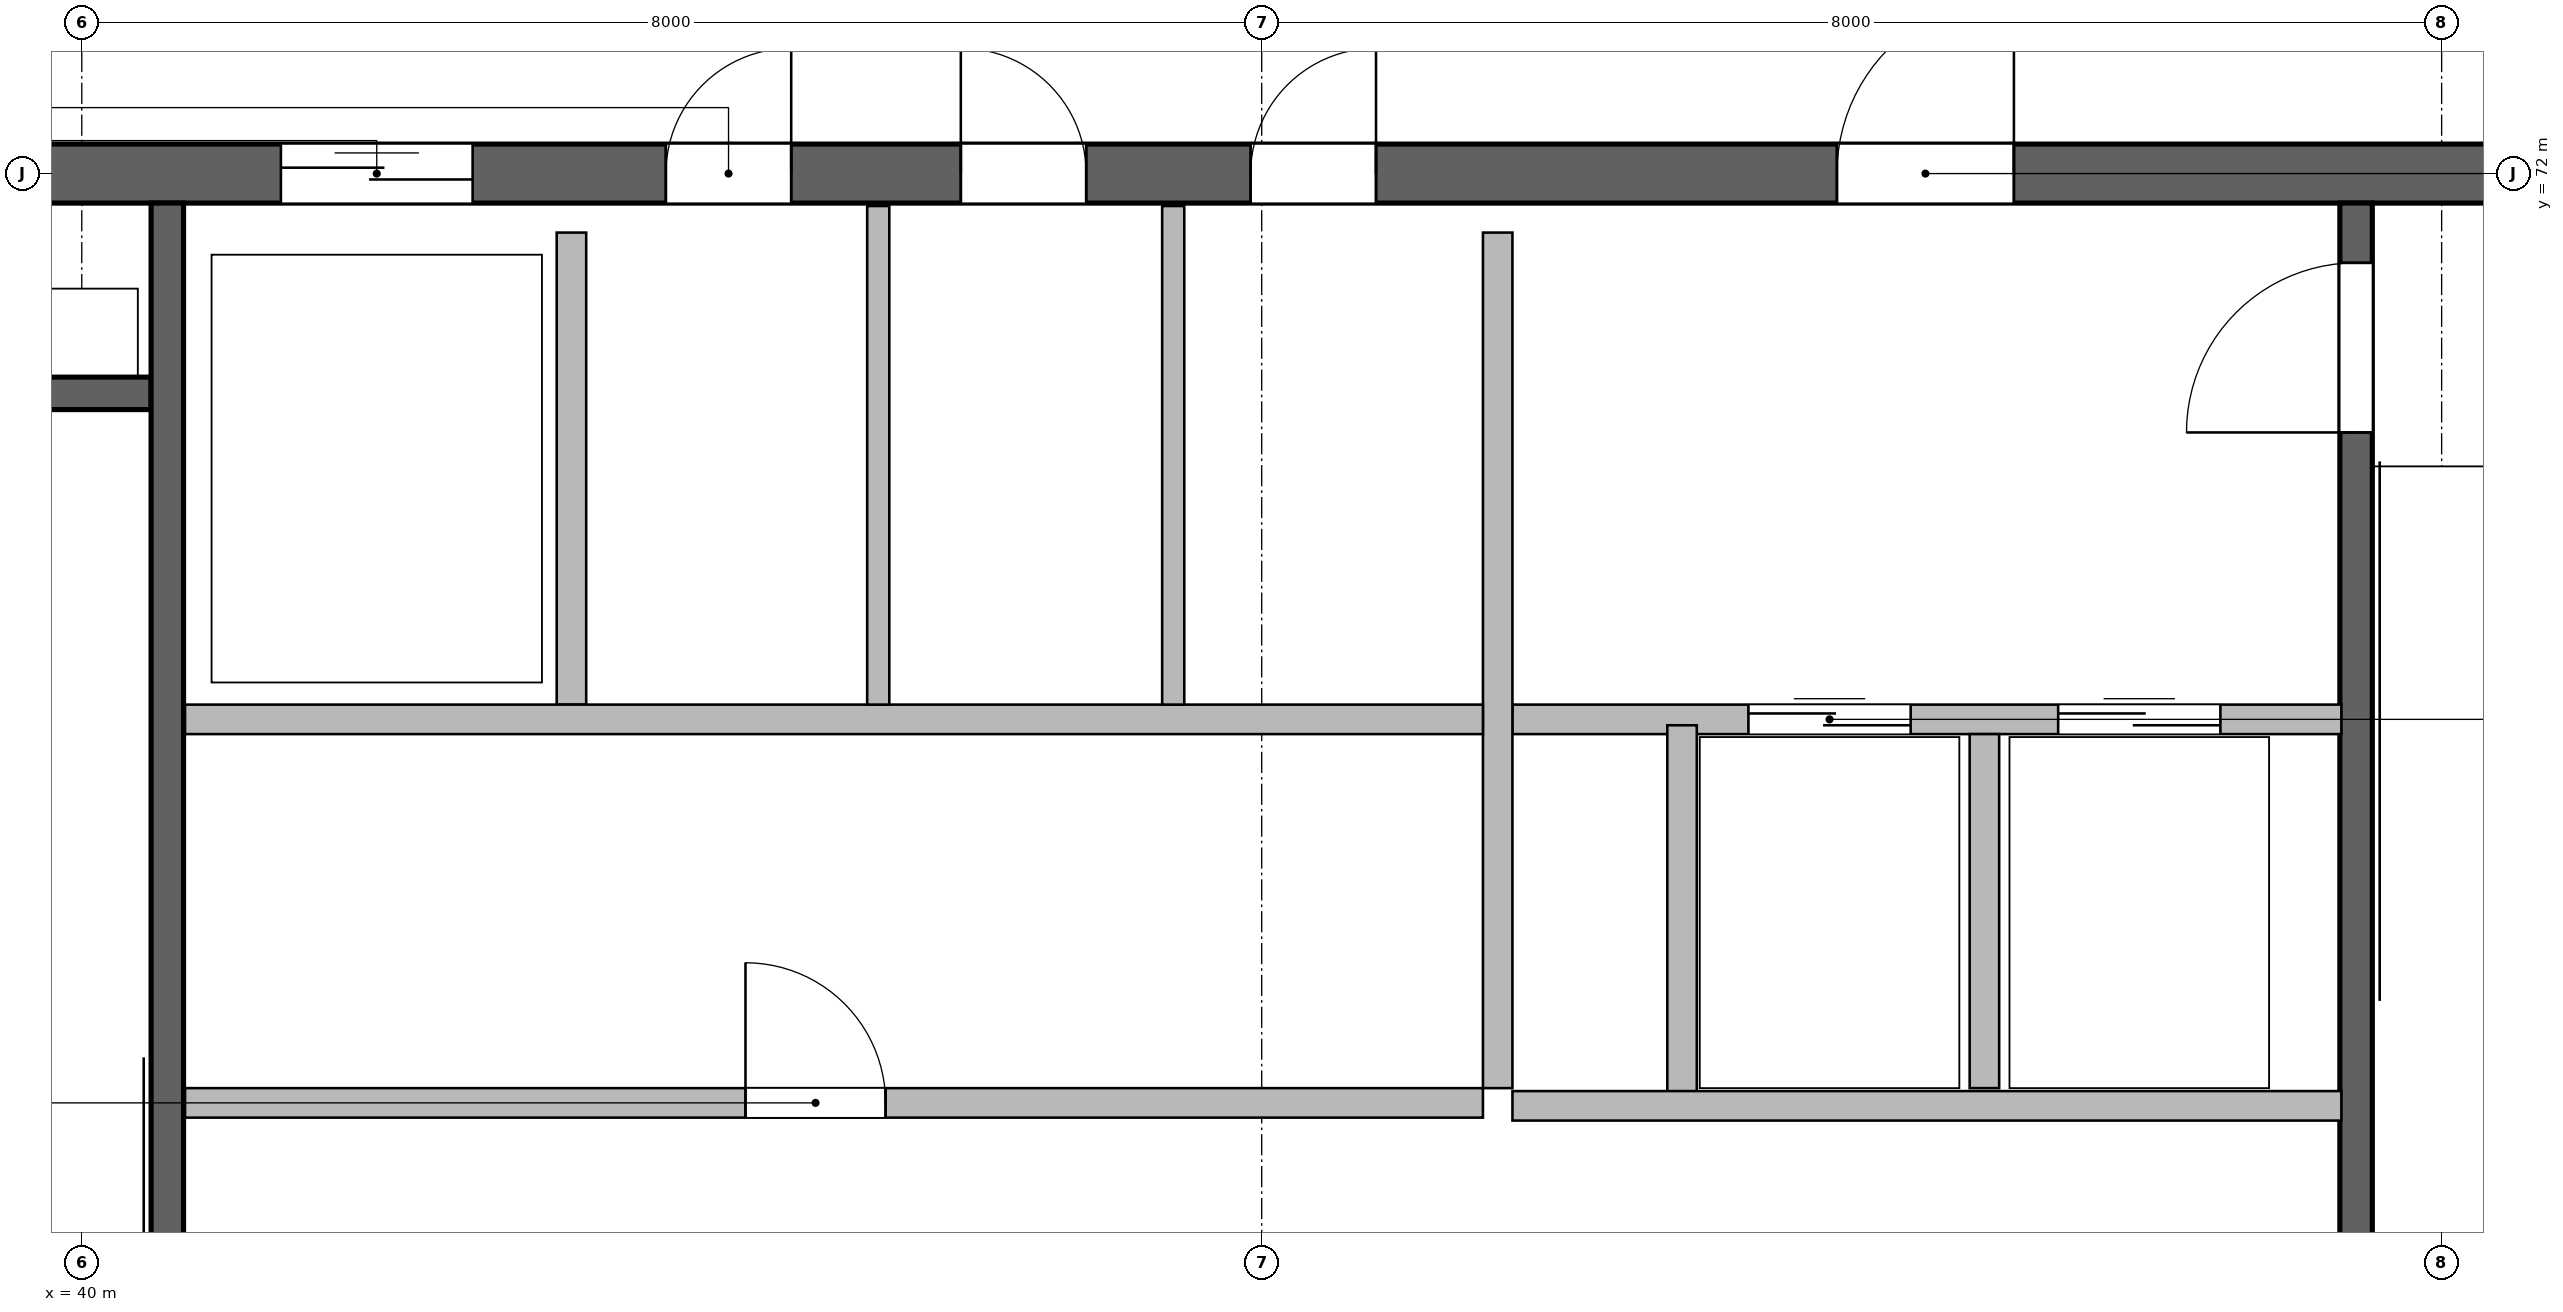
"""IFC4 building model, lengths in metres.
Left out: names, types, materials, properties, quantities, classifications, styles, units other than length and angle.
Written with IfcOpenShell. Run it as: python <this file> out.ifc"""

import sys

from ifc_helpers import new_model, si_unit, direction, frame, frame_2d, origin, place, context, subcontext, project, spatial, rectangle, extrude, source, transform, mapped, element, fill, save


model = new_model("IFC4")
c1 = context("Model", 3, precision=1e-05, world=origin(), true_north=direction((0.0, 1.0)))
c2 = subcontext(c1, "Body", "Model", "MODEL_VIEW")
j1 = project(units=[si_unit("LENGTHUNIT", "METRE"), si_unit("PLANEANGLEUNIT", "RADIAN")], contexts=[c1])
p1 = place(None, origin())
s1 = spatial("IfcSite", under=j1, at=p1, CompositionType="ELEMENT")
p2 = place(p1, origin())
s2 = spatial("IfcBuilding", under=s1, at=p2, CompositionType="ELEMENT")
p3 = place(p2, frame((0.0, 0.0, 303.0)))
s3 = spatial("IfcBuildingStorey", under=s2, at=p3, CompositionType="ELEMENT", Elevation=303.0)
m1 = source(origin(), c2, "Body", "SweptSolid", [
    extrude(rectangle(XDim=21.6, YDim=0.4, at=frame_2d((10.8, 0.0))), origin(), (0.0, 0.0, 1.0), 4.8),
])
p4 = place(p3, frame((37.2, 72.0, 0.0), z_axis=(0.0, 0.0, 1.0), x_axis=(1.0, 0.0, 0.0)))
e1 = element("IfcWall", 1, at=p4, inside=s3, PredefinedType="SHEAR", context=c2, shape_type="MappedRepresentation", body=[
    mapped(m1, transform((0.0, 0.0, 0.0), scale=1.0)),
])
p5 = place(p4, frame((1.2, 0.0, 0.0)))
e2 = element("IfcOpeningElement", 2, at=p5, cuts=e1, PredefinedType="OPENING", context=c2, shape_type="SweptSolid", body=[
    extrude(rectangle(XDim=0.9, YDim=2.1, at=frame_2d((0.45, 1.05))), frame((0.0, 0.21, 0.0), z_axis=(0.0, -1.0, 0.0), x_axis=(1.0, 0.0, 0.0)), (0.0, 0.0, 1.0), 0.42),
])
p6 = place(p4, frame((14.7, 0.0, 0.0)))
e3 = element("IfcOpeningElement", 3, at=p6, cuts=e1, PredefinedType="OPENING", context=c2, shape_type="SweptSolid", body=[
    extrude(rectangle(XDim=1.2, YDim=2.15, at=frame_2d((0.6, 1.075))), frame((0.0, 0.21, 0.0), z_axis=(0.0, -1.0, 0.0), x_axis=(1.0, 0.0, 0.0)), (0.0, 0.0, 1.0), 0.42),
])
p7 = place(p4, frame((4.15, 0.0, 0.0)))
e4 = element("IfcOpeningElement", 4, at=p7, cuts=e1, PredefinedType="OPENING", context=c2, shape_type="SweptSolid", body=[
    extrude(rectangle(XDim=1.3, YDim=2.15, at=frame_2d((0.65, 1.075))), frame((0.0, 0.21, 0.0), z_axis=(0.0, -1.0, 0.0), x_axis=(1.0, 0.0, 0.0)), (0.0, 0.0, 1.0), 0.42),
])
p8 = place(p4, frame((6.76, 0.0, 0.0)))
e5 = element("IfcOpeningElement", 5, at=p8, cuts=e1, PredefinedType="OPENING", context=c2, shape_type="SweptSolid", body=[
    extrude(rectangle(XDim=0.85, YDim=2.1, at=frame_2d((0.425, 1.05))), frame((0.0, 0.21, 0.0), z_axis=(0.0, -1.0, 0.0), x_axis=(1.0, 0.0, 0.0)), (0.0, 0.0, 1.0), 0.42),
])
p9 = place(p4, frame((8.76, 0.0, 0.0)))
e6 = element("IfcOpeningElement", 6, at=p9, cuts=e1, PredefinedType="OPENING", context=c2, shape_type="SweptSolid", body=[
    extrude(rectangle(XDim=0.85, YDim=2.1, at=frame_2d((0.425, 1.05))), frame((0.0, 0.21, 0.0), z_axis=(0.0, -1.0, 0.0), x_axis=(1.0, 0.0, 0.0)), (0.0, 0.0, 1.0), 0.42),
])
p10 = place(p4, frame((10.725, 0.0, 0.0)))
e7 = element("IfcOpeningElement", 7, at=p10, cuts=e1, PredefinedType="OPENING", context=c2, shape_type="SweptSolid", body=[
    extrude(rectangle(XDim=0.85, YDim=2.1, at=frame_2d((0.425, 1.05))), frame((0.0, 0.21, 0.0), z_axis=(0.0, -1.0, 0.0), x_axis=(1.0, 0.0, 0.0)), (0.0, 0.0, 1.0), 0.42),
])
m2 = source(origin(), c2, "Body", "SweptSolid", [
    extrude(rectangle(XDim=3.27, YDim=0.22, at=frame_2d((1.635, 0.0))), origin(), (0.0, 0.0, 1.0), 4.8),
])
p11 = place(p3, frame((37.2, 70.51, 0.0), z_axis=(0.0, 0.0, 1.0), x_axis=(1.0, 0.0, 0.0)))
e8 = element("IfcWall", 8, at=p11, inside=s3, PredefinedType="SHEAR", context=c2, shape_type="MappedRepresentation", body=[
    mapped(m2, transform((0.0, 0.0, 0.0), scale=1.0)),
])
m3 = source(origin(), c2, "Body", "SweptSolid", [
    extrude(rectangle(XDim=11.2, YDim=0.22, at=frame_2d((5.6, 0.0))), origin(), (0.0, 0.0, 1.0), 4.8),
])
p12 = place(p3, frame((40.58, 60.6, 0.0), z_axis=(0.0, 0.0, 1.0), x_axis=(0.0, 1.0, 0.0)))
e9 = element("IfcWall", 9, at=p12, inside=s3, PredefinedType="SHEAR", context=c2, shape_type="MappedRepresentation", body=[
    mapped(m3, transform((0.0, 0.0, 0.0), scale=1.0)),
])
p13 = place(p3, frame((55.42, 60.6, 0.0), z_axis=(0.0, 0.0, 1.0), x_axis=(0.0, 1.0, 0.0)))
e10 = element("IfcWall", 10, at=p13, inside=s3, PredefinedType="SHEAR", context=c2, shape_type="MappedRepresentation", body=[
    mapped(m3, transform((0.0, 0.0, 0.0), scale=1.0)),
])
p14 = place(p13, frame((9.645, 0.0, 0.0)))
e11 = element("IfcOpeningElement", 11, at=p14, cuts=e10, PredefinedType="OPENING", context=c2, shape_type="SweptSolid", body=[
    extrude(rectangle(XDim=1.15, YDim=2.15, at=frame_2d((0.575, 1.075))), frame((0.0, 0.12, 0.0), z_axis=(0.0, -1.0, 0.0), x_axis=(1.0, 0.0, 0.0)), (0.0, 0.0, 1.0), 0.24),
])
m4 = source(origin(), c2, "Body", "SweptSolid", [
    extrude(rectangle(XDim=5.62, YDim=0.2, at=frame_2d((2.81, 0.0))), origin(), (0.0, 0.0, 1.0), 4.54),
])
p15 = place(p3, frame((49.7, 68.3, 0.0), z_axis=(0.0, 0.0, 1.0), x_axis=(1.0, 0.0, 0.0)))
e12 = element("IfcWall", 12, at=p15, inside=s3, PredefinedType="SOLIDWALL", context=c2, shape_type="MappedRepresentation", body=[
    mapped(m4, transform((0.0, 0.0, 0.0), scale=1.0)),
])
p16 = place(p15, frame((1.6, 0.0, 0.0)))
e13 = element("IfcOpeningElement", 13, at=p16, cuts=e12, PredefinedType="OPENING", context=c2, shape_type="SweptSolid", body=[
    extrude(rectangle(XDim=1.1, YDim=2.15, at=frame_2d((0.55, 1.075))), frame((0.0, 0.11, 0.0), z_axis=(0.0, -1.0, 0.0), x_axis=(1.0, 0.0, 0.0)), (0.0, 0.0, 1.0), 0.22),
])
p17 = place(p15, frame((3.7, 0.0, 0.0)))
e14 = element("IfcOpeningElement", 14, at=p17, cuts=e12, PredefinedType="OPENING", context=c2, shape_type="SweptSolid", body=[
    extrude(rectangle(XDim=1.1, YDim=2.15, at=frame_2d((0.55, 1.075))), frame((0.0, 0.11, 0.0), z_axis=(0.0, -1.0, 0.0), x_axis=(1.0, 0.0, 0.0)), (0.0, 0.0, 1.0), 0.22),
])
m5 = source(origin(), c2, "Body", "SweptSolid", [
    extrude(rectangle(XDim=5.8, YDim=0.2, at=frame_2d((2.9, 0.0))), origin(), (0.0, 0.0, 1.0), 4.54),
])
p18 = place(p3, frame((49.6, 65.8, 0.0), z_axis=(0.0, 0.0, 1.0), x_axis=(0.0, 1.0, 0.0)))
e15 = element("IfcWall", 15, at=p18, inside=s3, PredefinedType="SOLIDWALL", context=c2, shape_type="MappedRepresentation", body=[
    mapped(m5, transform((0.0, 0.0, 0.0), scale=1.0)),
])
m6 = source(origin(), c2, "Body", "SweptSolid", [
    extrude(rectangle(XDim=2.58, YDim=0.2, at=frame_2d((1.29, 0.0))), origin(), (0.0, 0.0, 1.0), 4.54),
])
p19 = place(p3, frame((50.85, 65.68, 0.0), z_axis=(0.0, 0.0, 1.0), x_axis=(0.0, 1.0, 0.0)))
e16 = element("IfcWall", 16, at=p19, inside=s3, PredefinedType="SOLIDWALL", context=c2, shape_type="MappedRepresentation", body=[
    mapped(m6, transform((0.0, 0.0, 0.0), scale=1.0)),
])
m7 = source(origin(), c2, "Body", "SweptSolid", [
    extrude(rectangle(XDim=2.4, YDim=0.2, at=frame_2d((1.2, 0.0))), origin(), (0.0, 0.0, 1.0), 4.54),
])
p20 = place(p3, frame((52.9, 65.8, 0.0), z_axis=(0.0, 0.0, 1.0), x_axis=(0.0, 1.0, 0.0)))
e17 = element("IfcWall", 17, at=p20, inside=s3, PredefinedType="SOLIDWALL", context=c2, shape_type="MappedRepresentation", body=[
    mapped(m7, transform((0.0, 0.0, 0.0), scale=1.0)),
])
p21 = place(p3, frame((49.7, 65.68, 0.0), z_axis=(0.0, 0.0, 1.0), x_axis=(1.0, 0.0, 0.0)))
e18 = element("IfcWall", 18, at=p21, inside=s3, PredefinedType="SOLIDWALL", context=c2, shape_type="MappedRepresentation", body=[
    mapped(m4, transform((0.0, 0.0, 0.0), scale=1.0)),
])
m8 = source(origin(), c2, "Body", "SweptSolid", [
    extrude(rectangle(XDim=3.2, YDim=0.2, at=frame_2d((1.6, 0.0))), origin(), (0.0, 0.0, 1.0), 4.54),
])
p22 = place(p3, frame((43.32, 68.4, 0.0), z_axis=(0.0, 0.0, 1.0), x_axis=(0.0, 1.0, 0.0)))
e19 = element("IfcWall", 19, at=p22, inside=s3, PredefinedType="SOLIDWALL", context=c2, shape_type="MappedRepresentation", body=[
    mapped(m8, transform((0.0, 0.0, 0.0), scale=1.0)),
])
m9 = source(origin(), c2, "Body", "SweptSolid", [
    extrude(rectangle(XDim=8.8, YDim=0.2, at=frame_2d((4.4, 0.0))), origin(), (0.0, 0.0, 1.0), 4.54),
])
p23 = place(p3, frame((40.7, 68.3, 0.0), z_axis=(0.0, 0.0, 1.0), x_axis=(1.0, 0.0, 0.0)))
e20 = element("IfcWall", 20, at=p23, inside=s3, PredefinedType="SOLIDWALL", context=c2, shape_type="MappedRepresentation", body=[
    mapped(m9, transform((0.0, 0.0, 0.0), scale=1.0)),
])
m10 = source(origin(), c2, "Body", "SweptSolid", [
    extrude(rectangle(XDim=3.38, YDim=0.15, at=frame_2d((1.69, 0.0))), origin(), (0.0, 0.0, 1.0), 4.54),
])
for number, where, z_axis, x_axis in (
    (21, (45.4, 68.4, 0.0), (0.0, 0.0, 1.0), (0.0, 1.0, 0.0)),
    (22, (47.4, 68.4, 0.0), (0.0, 0.0, 1.0), (0.0, 1.0, 0.0)),
):
    element("IfcWall", number, at=place(p3, frame(where, z_axis=z_axis, x_axis=x_axis)), inside=s3, PredefinedType="PARTITIONING", context=c2, shape_type="MappedRepresentation", body=[
        mapped(m10, transform((0.0, 0.0, 0.0), scale=1.0)),
    ])
p24 = place(p3, frame((40.7, 65.7, 0.0), z_axis=(0.0, 0.0, 1.0), x_axis=(1.0, 0.0, 0.0)))
e23 = element("IfcWall", 23, at=p24, inside=s3, PredefinedType="SOLIDWALL", context=c2, shape_type="MappedRepresentation", body=[
    mapped(m9, transform((0.0, 0.0, 0.0), scale=1.0)),
])
p25 = place(p24, frame((3.8, 0.0, 0.0)))
e24 = element("IfcOpeningElement", 24, at=p25, cuts=e23, PredefinedType="OPENING", context=c2, shape_type="SweptSolid", body=[
    extrude(rectangle(XDim=0.95, YDim=2.15, at=frame_2d((0.475, 1.075))), frame((0.0, 0.11, 0.0), z_axis=(0.0, -1.0, 0.0), x_axis=(1.0, 0.0, 0.0)), (0.0, 0.0, 1.0), 0.22),
])
m11 = source(origin(), c2, "Body", "SweptSolid", [
    extrude(rectangle(XDim=1.15, YDim=2.15, at=frame_2d((0.575, 1.075))), frame((0.0, 0.025, 0.0), z_axis=(0.0, -1.0, 0.0), x_axis=(1.0, 0.0, 0.0)), (0.0, 0.0, 1.0), 0.05),
])
p26 = place(p14, origin())
e25 = element("IfcDoor", 25, at=p26, inside=s3, OperationType="SINGLE_SWING_LEFT", PredefinedType="DOOR", context=c2, shape_type="MappedRepresentation", body=[
    mapped(m11, transform((0.0, 0.0, 0.0), scale=1.0)),
])
fill(e11, e25)
m12 = source(origin(), c2, "Body", "SweptSolid", [
    extrude(rectangle(XDim=1.2, YDim=2.15, at=frame_2d((0.6, 1.075))), frame((0.0, 0.025, 0.0), z_axis=(0.0, -1.0, 0.0), x_axis=(1.0, 0.0, 0.0)), (0.0, 0.0, 1.0), 0.05),
])
p27 = place(p6, origin())
e26 = element("IfcDoor", 26, at=p27, inside=s3, OperationType="SINGLE_SWING_RIGHT", PredefinedType="DOOR", context=c2, shape_type="MappedRepresentation", body=[
    mapped(m12, transform((0.0, 0.0, 0.0), scale=1.0)),
])
fill(e3, e26)
m13 = source(origin(), c2, "Body", "SweptSolid", [
    extrude(rectangle(XDim=1.1, YDim=2.15, at=frame_2d((0.55, 1.075))), frame((0.0, 0.025, 0.0), z_axis=(0.0, -1.0, 0.0), x_axis=(1.0, 0.0, 0.0)), (0.0, 0.0, 1.0), 0.05),
])
p28 = place(p16, origin())
e27 = element("IfcDoor", 27, at=p28, inside=s3, OperationType="DOUBLE_DOOR_SLIDING", PredefinedType="DOOR", context=c2, shape_type="MappedRepresentation", body=[
    mapped(m13, transform((0.0, 0.0, 0.0), scale=1.0)),
])
fill(e13, e27)
p29 = place(p17, origin())
e28 = element("IfcDoor", 28, at=p29, inside=s3, OperationType="DOUBLE_DOOR_SLIDING", PredefinedType="DOOR", context=c2, shape_type="MappedRepresentation", body=[
    mapped(m13, transform((0.0, 0.0, 0.0), scale=1.0)),
])
fill(e14, e28)
m14 = source(origin(), c2, "Body", "SweptSolid", [
    extrude(rectangle(XDim=1.3, YDim=2.15, at=frame_2d((0.65, 1.075))), frame((0.0, 0.025, 0.0), z_axis=(0.0, -1.0, 0.0), x_axis=(1.0, 0.0, 0.0)), (0.0, 0.0, 1.0), 0.05),
])
p30 = place(p7, origin())
e29 = element("IfcDoor", 29, at=p30, inside=s3, OperationType="DOUBLE_DOOR_SLIDING", PredefinedType="DOOR", context=c2, shape_type="MappedRepresentation", body=[
    mapped(m14, transform((0.0, 0.0, 0.0), scale=1.0)),
])
fill(e4, e29)
m15 = source(origin(), c2, "Body", "SweptSolid", [
    extrude(rectangle(XDim=0.85, YDim=2.1, at=frame_2d((0.425, 1.05))), frame((0.0, 0.025, 0.0), z_axis=(0.0, -1.0, 0.0), x_axis=(1.0, 0.0, 0.0)), (0.0, 0.0, 1.0), 0.05),
])
p31 = place(p8, origin())
e30 = element("IfcDoor", 30, at=p31, inside=s3, OperationType="SINGLE_SWING_RIGHT", PredefinedType="DOOR", context=c2, shape_type="MappedRepresentation", body=[
    mapped(m15, transform((0.0, 0.0, 0.0), scale=1.0)),
])
fill(e5, e30)
p32 = place(p9, origin())
e31 = element("IfcDoor", 31, at=p32, inside=s3, OperationType="SINGLE_SWING_LEFT", PredefinedType="DOOR", context=c2, shape_type="MappedRepresentation", body=[
    mapped(m15, transform((0.0, 0.0, 0.0), scale=1.0)),
])
fill(e6, e31)
p33 = place(p10, origin())
e32 = element("IfcDoor", 32, at=p33, inside=s3, OperationType="SINGLE_SWING_RIGHT", PredefinedType="DOOR", context=c2, shape_type="MappedRepresentation", body=[
    mapped(m15, transform((0.0, 0.0, 0.0), scale=1.0)),
])
fill(e7, e32)
m16 = source(origin(), c2, "Body", "SweptSolid", [
    extrude(rectangle(XDim=0.95, YDim=2.15, at=frame_2d((0.475, 1.075))), frame((0.0, 0.025, 0.0), z_axis=(0.0, -1.0, 0.0), x_axis=(1.0, 0.0, 0.0)), (0.0, 0.0, 1.0), 0.05),
])
p34 = place(p25, origin())
e33 = element("IfcDoor", 33, at=p34, inside=s3, OperationType="SINGLE_SWING_LEFT", PredefinedType="DOOR", context=c2, shape_type="MappedRepresentation", body=[
    mapped(m16, transform((0.0, 0.0, 0.0), scale=1.0)),
])
fill(e24, e33)
save(model, sys.argv[1])
